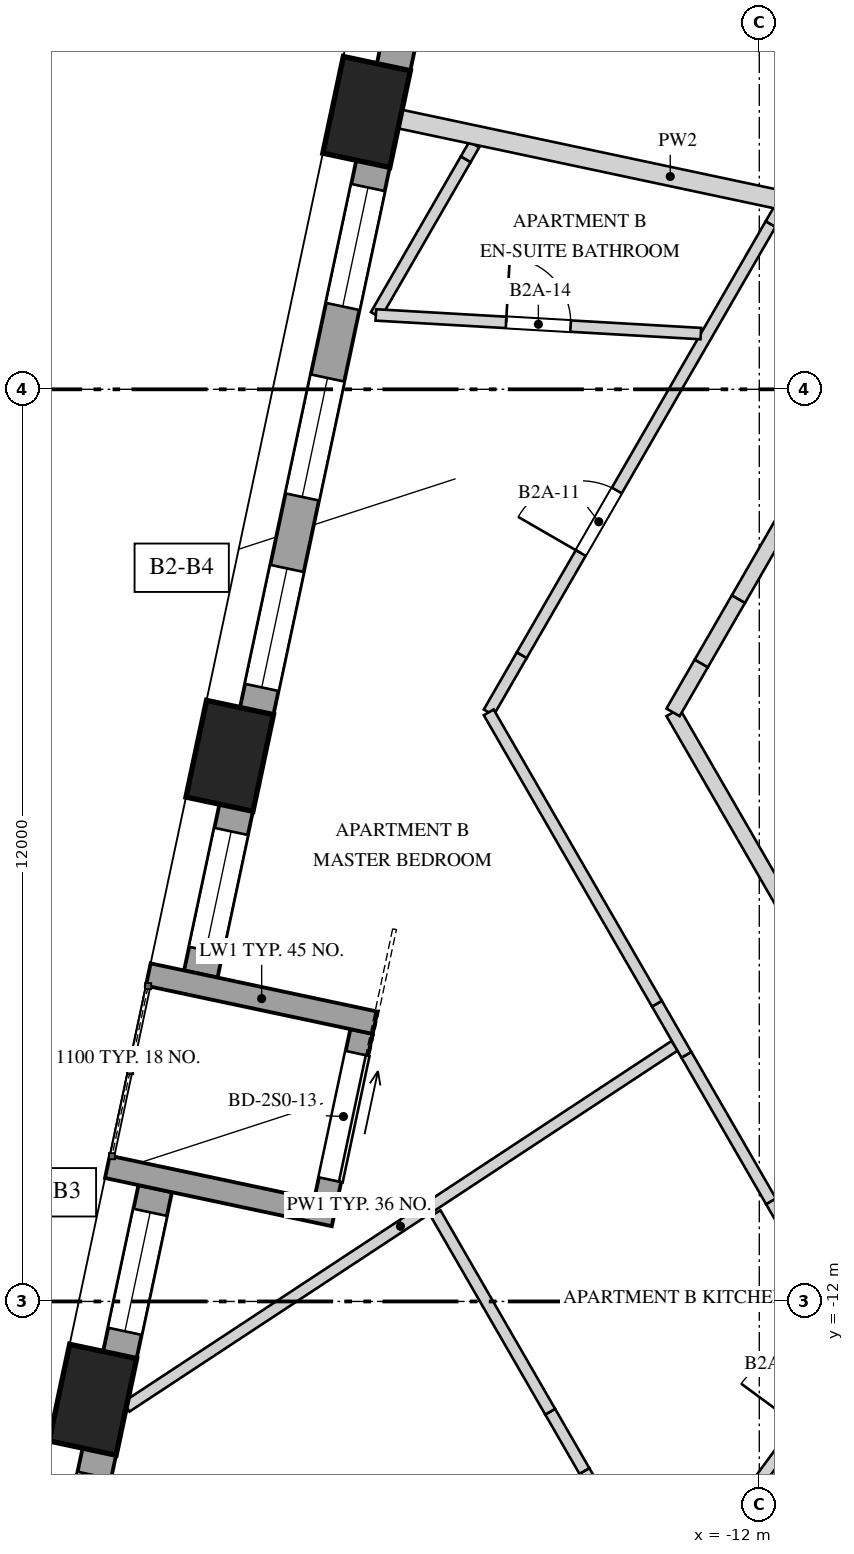
"""IFC4 building model, lengths in metres.
Left out: names, types, materials, properties, quantities, classifications, styles, units other than length and angle.
Written with IfcOpenShell. Run it as: python <this file> out.ifc"""

import sys

from ifc_helpers import new_model, si_unit, direction, frame, frame_2d, origin, origin_2d, place, context, subcontext, project, spatial, rectangle, extrude, element, fill, save


model = new_model("IFC4")
c1 = context("Model", 3, precision=1e-05, world=origin(), true_north=direction((0.0, 1.0)))
c2 = subcontext(c1, "Body", "Model", "MODEL_VIEW")
j1 = project(units=[si_unit("LENGTHUNIT", "METRE"), si_unit("PLANEANGLEUNIT", "RADIAN")], contexts=[c1])
p1 = place(None, origin())
s1 = spatial("IfcSite", under=j1, at=p1, CompositionType="ELEMENT")
p2 = place(p1, origin())
s2 = spatial("IfcBuilding", under=s1, at=p2, CompositionType="ELEMENT")
p3 = place(p2, frame((0.0, 0.0, 88.4)))
s3 = spatial("IfcBuildingStorey", under=s2, at=p3, CompositionType="ELEMENT", Elevation=88.4)
for number, where, z_axis, x_axis in (
    (1, (-17.167, 3.649, -0.35), (0.0, 0.0, 1.0), (-0.208, -0.978, 0.0)),
    (2, (-18.967, -4.822, -0.35), (0.0, 0.0, 1.0), (-0.208, -0.978, 0.0)),
    (3, (-20.768, -13.293, -0.35), (0.0, 0.0, 1.0), (-0.208, -0.978, 0.0)),
):
    element("IfcColumn", number, at=place(p3, frame(where, z_axis=z_axis, x_axis=x_axis)), inside=s3, PredefinedType="COLUMN", context=c2, shape_type="SweptSolid", body=[
        extrude(rectangle(XDim=1.3, YDim=0.9, at=origin_2d()), origin(), (0.0, 0.0, 1.0), 4.35),
    ])
p4 = place(p3, frame((-16.346, 6.426, 0.0), z_axis=(0.0, 0.0, 1.0), x_axis=(-0.207918801611, -0.978146089261, 0.0)))
e4 = element("IfcWall", 4, at=p4, inside=s3, PredefinedType="SOLIDWALL", context=c2, shape_type="SweptSolid", body=[
    extrude(rectangle(XDim=2.237, YDim=0.45, at=frame_2d((1.118, 0.0))), origin(), (0.0, 0.0, 1.0), 3.3),
])
p5 = place(p4, frame((0.318, 0.0, 0.7)))
e5 = element("IfcOpeningElement", 5, at=p5, cuts=e4, PredefinedType="OPENING", context=c2, shape_type="SweptSolid", body=[
    extrude(rectangle(XDim=1.6, YDim=2.3, at=frame_2d((0.8, 1.15))), frame((0.0, 0.235, 0.0), z_axis=(0.0, -1.0, 0.0), x_axis=(1.0, 0.0, 0.0)), (0.0, 0.0, 1.0), 0.47),
])
p6 = place(p3, frame((-17.082, 2.966, 0.0), z_axis=(0.0, 0.0, 1.0), x_axis=(-0.207909137741, -0.978148143403, 0.0)))
e6 = element("IfcWall", 6, at=p6, inside=s3, PredefinedType="SOLIDWALL", context=c2, shape_type="SweptSolid", body=[
    extrude(rectangle(XDim=7.36, YDim=0.45, at=frame_2d((3.68, 0.0))), origin(), (0.0, 0.0, 1.0), 3.3),
])
p7 = place(p6, frame((0.318, 0.0, 0.7)))
e7 = element("IfcOpeningElement", 7, at=p7, cuts=e6, PredefinedType="OPENING", context=c2, shape_type="SweptSolid", body=[
    extrude(rectangle(XDim=1.6, YDim=2.3, at=frame_2d((0.8, 1.15))), frame((0.0, 0.235, 0.0), z_axis=(0.0, -1.0, 0.0), x_axis=(1.0, 0.0, 0.0)), (0.0, 0.0, 1.0), 0.47),
])
p8 = place(p6, frame((2.88, 0.0, 0.7)))
e8 = element("IfcOpeningElement", 8, at=p8, cuts=e6, PredefinedType="OPENING", context=c2, shape_type="SweptSolid", body=[
    extrude(rectangle(XDim=1.6, YDim=2.3, at=frame_2d((0.8, 1.15))), frame((0.0, 0.235, 0.0), z_axis=(0.0, -1.0, 0.0), x_axis=(1.0, 0.0, 0.0)), (0.0, 0.0, 1.0), 0.47),
])
p9 = place(p6, frame((5.442, 0.0, 0.7)))
e9 = element("IfcOpeningElement", 9, at=p9, cuts=e6, PredefinedType="OPENING", context=c2, shape_type="SweptSolid", body=[
    extrude(rectangle(XDim=1.6, YDim=2.3, at=frame_2d((0.8, 1.15))), frame((0.0, 0.235, 0.0), z_axis=(0.0, -1.0, 0.0), x_axis=(1.0, 0.0, 0.0)), (0.0, 0.0, 1.0), 0.47),
])
p10 = place(p3, frame((-18.882, -5.505, 0.0), z_axis=(0.0, 0.0, 1.0), x_axis=(-0.207918801611, -0.978146089261, 0.0)))
e10 = element("IfcWall", 10, at=p10, inside=s3, PredefinedType="SOLIDWALL", context=c2, shape_type="SweptSolid", body=[
    extrude(rectangle(XDim=2.237, YDim=0.45, at=frame_2d((1.118, 0.0))), origin(), (0.0, 0.0, 1.0), 3.3),
])
p11 = place(p10, frame((0.318, 0.0, 0.7)))
e11 = element("IfcOpeningElement", 11, at=p11, cuts=e10, PredefinedType="OPENING", context=c2, shape_type="SweptSolid", body=[
    extrude(rectangle(XDim=1.6, YDim=2.3, at=frame_2d((0.8, 1.15))), frame((0.0, 0.235, 0.0), z_axis=(0.0, -1.0, 0.0), x_axis=(1.0, 0.0, 0.0)), (0.0, 0.0, 1.0), 0.47),
])
p12 = place(p3, frame((-19.947, -10.516, 0.0), z_axis=(0.0, 0.0, 1.0), x_axis=(-0.207941001029, -0.978141370197, 0.0)))
e12 = element("IfcWall", 12, at=p12, inside=s3, PredefinedType="SOLIDWALL", context=c2, shape_type="SweptSolid", body=[
    extrude(rectangle(XDim=2.237, YDim=0.45, at=frame_2d((1.118, 0.0))), origin(), (0.0, 0.0, 1.0), 3.3),
])
p13 = place(p12, frame((0.318, 0.0, 0.7)))
e13 = element("IfcOpeningElement", 13, at=p13, cuts=e12, PredefinedType="OPENING", context=c2, shape_type="SweptSolid", body=[
    extrude(rectangle(XDim=1.6, YDim=2.3, at=frame_2d((0.8, 1.15))), frame((0.0, 0.235, 0.0), z_axis=(0.0, -1.0, 0.0), x_axis=(1.0, 0.0, 0.0)), (0.0, 0.0, 1.0), 0.47),
])
p14 = place(p3, frame((-20.683, -13.976, 0.0), z_axis=(0.0, 0.0, 1.0), x_axis=(-0.207941001029, -0.978141370197, 0.0)))
e14 = element("IfcWall", 14, at=p14, inside=s3, PredefinedType="SOLIDWALL", context=c2, shape_type="SweptSolid", body=[
    extrude(rectangle(XDim=2.237, YDim=0.45, at=frame_2d((1.118, 0.0))), origin(), (0.0, 0.0, 1.0), 3.3),
])
p15 = place(p14, frame((0.318, 0.0, 0.7)))
e15 = element("IfcOpeningElement", 15, at=p15, cuts=e14, PredefinedType="OPENING", context=c2, shape_type="SweptSolid", body=[
    extrude(rectangle(XDim=1.6, YDim=2.3, at=frame_2d((0.8, 1.15))), frame((0.0, 0.235, 0.0), z_axis=(0.0, -1.0, 0.0), x_axis=(1.0, 0.0, 0.0)), (0.0, 0.0, 1.0), 0.47),
])
p16 = place(p3, frame((-17.233, -8.449, 0.0), z_axis=(0.0, 0.0, 1.0), x_axis=(-0.207866417042, -0.978157222877, 0.0)))
e16 = element("IfcWall", 16, at=p16, inside=s3, PredefinedType="SOLIDWALL", context=c2, shape_type="SweptSolid", body=[
    extrude(rectangle(XDim=2.287, YDim=0.3, at=frame_2d((1.144, 0.0))), origin(), (0.0, 0.0, 1.0), 3.3),
])
p17 = place(p16, frame((0.293, 0.0, 0.0)))
e17 = element("IfcOpeningElement", 17, at=p17, cuts=e16, PredefinedType="OPENING", context=c2, shape_type="SweptSolid", body=[
    extrude(rectangle(XDim=1.7, YDim=2.4, at=frame_2d((0.85, 1.2))), frame((0.0, 0.16, 0.0), z_axis=(0.0, -1.0, 0.0), x_axis=(1.0, 0.0, 0.0)), (0.0, 0.0, 1.0), 0.32),
])
for number, where, z_axis, x_axis in (
    (18, (-20.039, -7.699, 0.0), (0.0, 0.0, 1.0), (0.978, -0.208, 0.0)),
    (19, (-20.576, -10.229, 0.0), (0.0, 0.0, 1.0), (0.978, -0.208, 0.0)),
):
    element("IfcWall", number, at=place(p3, frame(where, z_axis=z_axis, x_axis=x_axis)), inside=s3, PredefinedType="SOLIDWALL", context=c2, shape_type="SweptSolid", body=[
        extrude(rectangle(XDim=3.05, YDim=0.3, at=frame_2d((1.525, 0.0))), origin(), (0.0, 0.0, 1.0), 3.3),
    ])
p18 = place(p3, frame((-20.327, -13.387, 0.0), z_axis=(0.0, 0.0, 1.0), x_axis=(0.835168014777, 0.549994897334, 0.0)))
e20 = element("IfcWall", 20, at=p18, inside=s3, PredefinedType="PARTITIONING", context=c2, shape_type="SweptSolid", body=[
    extrude(rectangle(XDim=8.637, YDim=0.15, at=frame_2d((4.319, 0.0))), origin(), (0.0, 0.0, 1.0), 2.75),
])
p19 = place(p3, frame((-17.044, 0.979, 0.0), z_axis=(0.0, 0.0, 1.0), x_axis=(0.499969694265, 0.866042900102, 0.0)))
e21 = element("IfcWall", 21, at=p19, inside=s3, PredefinedType="PARTITIONING", context=c2, shape_type="SweptSolid", body=[
    extrude(rectangle(XDim=2.365, YDim=0.15, at=frame_2d((1.183, 0.0))), origin(), (0.0, 0.0, 1.0), 3.65),
])
p20 = place(p3, frame((-15.862, 3.027, 0.0), z_axis=(0.0, 0.0, 1.0), x_axis=(0.500605348058, 0.865675623716, 0.0)))
e22 = element("IfcWall", 22, at=p20, inside=s3, PredefinedType="PARTITIONING", context=c2, shape_type="SweptSolid", body=[
    extrude(rectangle(XDim=0.223, YDim=0.15, at=frame_2d((0.112, 0.0))), origin(), (0.0, 0.0, 1.0), 2.95),
])
p21 = place(p3, frame((-15.56, -4.25, 0.0), z_axis=(0.0, 0.0, 1.0), x_axis=(0.499884524299, 0.866092063448, 0.0)))
e23 = element("IfcWall", 23, at=p21, inside=s3, PredefinedType="PARTITIONING", context=c2, shape_type="SweptSolid", body=[
    extrude(rectangle(XDim=0.869, YDim=0.15, at=frame_2d((0.435, 0.0))), origin(), (0.0, 0.0, 1.0), 2.95),
])
p22 = place(p3, frame((-15.125, -3.497, 0.0), z_axis=(0.0, 0.0, 1.0), x_axis=(0.500008610982, 0.866020432175, 0.0)))
e24 = element("IfcWall", 24, at=p22, inside=s3, PredefinedType="PARTITIONING", context=c2, shape_type="SweptSolid", body=[
    extrude(rectangle(XDim=6.548, YDim=0.15, at=frame_2d((3.274, 0.0))), origin(), (0.0, 0.0, 1.0), 3.65),
])
p23 = place(p22, frame((1.551, 0.0, 0.0)))
e25 = element("IfcOpeningElement", 25, at=p23, cuts=e24, PredefinedType="OPENING", context=c2, shape_type="SweptSolid", body=[
    extrude(rectangle(XDim=0.95, YDim=2.4, at=frame_2d((0.475, 1.2))), frame((0.0, 0.085, 0.0), z_axis=(0.0, -1.0, 0.0), x_axis=(1.0, 0.0, 0.0)), (0.0, 0.0, 1.0), 0.17),
])
p24 = place(p3, frame((-11.851, 2.174, 0.0), z_axis=(0.0, 0.0, 1.0), x_axis=(0.500059846627, 0.865990848561, 0.0)))
e26 = element("IfcWall", 26, at=p24, inside=s3, PredefinedType="PARTITIONING", context=c2, shape_type="SweptSolid", body=[
    extrude(rectangle(XDim=0.71, YDim=0.15, at=frame_2d((0.355, 0.0))), origin(), (0.0, 0.0, 1.0), 2.95),
])
p25 = place(p3, frame((-13.712, -15.25, 0.0), z_axis=(0.0, 0.0, 1.0), x_axis=(-0.499907924584, 0.866078557025, 0.0)))
e27 = element("IfcWall", 27, at=p25, inside=s3, PredefinedType="PARTITIONING", context=c2, shape_type="SweptSolid", body=[
    extrude(rectangle(XDim=1.177, YDim=0.15, at=frame_2d((0.589, 0.0))), origin(), (0.0, 0.0, 1.0), 3.65),
])
p26 = place(p3, frame((-14.301, -14.23, 0.0), z_axis=(0.0, 0.0, 1.0), x_axis=(-0.499988457423, 0.866032067792, 0.0)))
e28 = element("IfcWall", 28, at=p26, inside=s3, PredefinedType="PARTITIONING", context=c2, shape_type="SweptSolid", body=[
    extrude(rectangle(XDim=0.9, YDim=0.15, at=frame_2d((0.45, 0.0))), origin(), (0.0, 0.0, 1.0), 2.55),
])
p27 = place(p3, frame((-14.751, -13.45, 0.0), z_axis=(0.0, 0.0, 1.0), x_axis=(-0.499979445284, 0.86603727073, 0.0)))
e29 = element("IfcWall", 29, at=p27, inside=s3, PredefinedType="PARTITIONING", context=c2, shape_type="SweptSolid", body=[
    extrude(rectangle(XDim=3.015, YDim=0.15, at=frame_2d((1.508, 0.0))), origin(), (0.0, 0.0, 1.0), 3.65),
])
p28 = place(p3, frame((-17.044, 0.979, 0.0), z_axis=(0.0, 0.0, 1.0), x_axis=(0.998356921025, -0.057301468054, 0.0)))
e30 = element("IfcWall", 30, at=p28, inside=s3, PredefinedType="PARTITIONING", context=c2, shape_type="SweptSolid", body=[
    extrude(rectangle(XDim=4.282, YDim=0.15, at=frame_2d((2.141, 0.0))), origin(), (0.0, 0.0, 1.0), 3.65),
])
p29 = place(p28, frame((1.716, 0.0, 0.0)))
e31 = element("IfcOpeningElement", 31, at=p29, cuts=e30, PredefinedType="OPENING", context=c2, shape_type="SweptSolid", body=[
    extrude(rectangle(XDim=0.85, YDim=2.4, at=frame_2d((0.425, 1.2))), frame((0.0, 0.085, 0.0), z_axis=(0.0, -1.0, 0.0), x_axis=(1.0, 0.0, 0.0)), (0.0, 0.0, 1.0), 0.17),
])
p30 = place(p3, frame((-12.599, -15.175, 0.0), z_axis=(0.0, 0.0, 1.0), x_axis=(0.592829004129, 0.805328362758, 0.0)))
e32 = element("IfcWall", 32, at=p30, inside=s3, PredefinedType="PARTITIONING", context=c2, shape_type="SweptSolid", body=[
    extrude(rectangle(XDim=4.75, YDim=0.15, at=frame_2d((2.375, 0.0))), origin(), (0.0, 0.0, 1.0), 3.65),
])
p31 = place(p30, frame((1.9, 0.0, 0.0)))
e33 = element("IfcOpeningElement", 33, at=p31, cuts=e32, PredefinedType="OPENING", context=c2, shape_type="SweptSolid", body=[
    extrude(rectangle(XDim=0.95, YDim=2.4, at=frame_2d((0.475, 1.2))), frame((0.0, 0.085, 0.0), z_axis=(0.0, -1.0, 0.0), x_axis=(1.0, 0.0, 0.0)), (0.0, 0.0, 1.0), 0.17),
])
p32 = place(p3, frame((-11.46, -11.35, 0.0), z_axis=(0.0, 0.0, 1.0), x_axis=(-0.49974986996, 0.866169768276, 0.0)))
e34 = element("IfcWall", 34, at=p32, inside=s3, PredefinedType="PARTITIONING", context=c2, shape_type="SweptSolid", body=[
    extrude(rectangle(XDim=0.771, YDim=0.15, at=frame_2d((0.385, 0.0))), origin(), (0.0, 0.0, 1.0), 2.55),
])
p33 = place(p3, frame((-11.846, -10.682, 0.0), z_axis=(0.0, 0.0, 1.0), x_axis=(-0.500067425712, 0.865986472032, 0.0)))
e35 = element("IfcWall", 35, at=p33, inside=s3, PredefinedType="PARTITIONING", context=c2, shape_type="SweptSolid", body=[
    extrude(rectangle(XDim=2.226, YDim=0.15, at=frame_2d((1.113, 0.0))), origin(), (0.0, 0.0, 1.0), 3.65),
])
p34 = place(p3, frame((-12.959, -8.755, 0.0), z_axis=(0.0, 0.0, 1.0), x_axis=(-0.500031167255, 0.866007408613, 0.0)))
e36 = element("IfcWall", 36, at=p34, inside=s3, PredefinedType="PARTITIONING", context=c2, shape_type="SweptSolid", body=[
    extrude(rectangle(XDim=0.776, YDim=0.15, at=frame_2d((0.388, 0.0))), origin(), (0.0, 0.0, 1.0), 2.75),
])
p35 = place(p3, frame((-13.347, -8.083, 0.0), z_axis=(0.0, 0.0, 1.0), x_axis=(-0.499983483481, 0.866034939391, 0.0)))
e37 = element("IfcWall", 37, at=p35, inside=s3, PredefinedType="PARTITIONING", context=c2, shape_type="SweptSolid", body=[
    extrude(rectangle(XDim=4.426, YDim=0.15, at=frame_2d((2.213, 0.0))), origin(), (0.0, 0.0, 1.0), 3.65),
])
p36 = place(p3, frame((-9.616, 2.044, 0.0), z_axis=(0.0, 0.0, 1.0), x_axis=(-0.978148093834, 0.207909370951, 0.0)))
e38 = element("IfcWall", 38, at=p36, inside=s3, PredefinedType="SOLIDWALL", context=c2, shape_type="SweptSolid", body=[
    extrude(rectangle(XDim=7.269, YDim=0.25, at=frame_2d((3.634, 0.0))), origin(), (0.0, 0.0, 1.0), 2.95),
])
p37 = place(p3, frame((-11.582, -6.939, 0.0), z_axis=(0.0, 0.0, 1.0), x_axis=(-0.500037831766, 0.866003560503, 0.0)))
e39 = element("IfcWall", 39, at=p37, inside=s3, PredefinedType="SOLIDWALL", context=c2, shape_type="SweptSolid", body=[
    extrude(rectangle(XDim=3.105, YDim=0.2, at=frame_2d((1.552, 0.0))), origin(), (0.0, 0.0, 1.0), 3.65),
])
p38 = place(p3, frame((-13.135, -4.25, 0.0), z_axis=(0.0, 0.0, 1.0), x_axis=(0.499987686533, 0.866032512851, 0.0)))
e40 = element("IfcWall", 40, at=p38, inside=s3, PredefinedType="SOLIDWALL", context=c2, shape_type="SweptSolid", body=[
    extrude(rectangle(XDim=0.744, YDim=0.2, at=frame_2d((0.372, 0.0))), origin(), (0.0, 0.0, 1.0), 3.65),
])
p39 = place(p3, frame((-12.763, -3.606, 0.0), z_axis=(0.0, 0.0, 1.0), x_axis=(0.500061185694, 0.865990075325, 0.0)))
e41 = element("IfcWall", 41, at=p39, inside=s3, PredefinedType="SOLIDWALL", context=c2, shape_type="SweptSolid", body=[
    extrude(rectangle(XDim=0.978, YDim=0.2, at=frame_2d((0.489, 0.0))), origin(), (0.0, 0.0, 1.0), 2.95),
])
p40 = place(p3, frame((-12.274, -2.76, 0.0), z_axis=(0.0, 0.0, 1.0), x_axis=(0.500001317485, 0.866024643133, 0.0)))
e42 = element("IfcWall", 42, at=p40, inside=s3, PredefinedType="SOLIDWALL", context=c2, shape_type="SweptSolid", body=[
    extrude(rectangle(XDim=5.153, YDim=0.2, at=frame_2d((2.577, 0.0))), origin(), (0.0, 0.0, 1.0), 3.65),
])
p41 = place(p7, origin())
e43 = element("IfcWindow", 43, at=p41, inside=s3, PartitioningType="SINGLE_PANEL", PredefinedType="WINDOW", context=c2, shape_type="SweptSolid", body=[
    extrude(rectangle(XDim=1.6, YDim=2.3, at=frame_2d((0.8, 1.15))), frame((0.0, 0.03, 0.0), z_axis=(0.0, -1.0, 0.0), x_axis=(1.0, 0.0, 0.0)), (0.0, 0.0, 1.0), 0.06),
])
fill(e7, e43)
p42 = place(p8, origin())
e44 = element("IfcWindow", 44, at=p42, inside=s3, PartitioningType="SINGLE_PANEL", PredefinedType="WINDOW", context=c2, shape_type="SweptSolid", body=[
    extrude(rectangle(XDim=1.6, YDim=2.3, at=frame_2d((0.8, 1.15))), frame((0.0, 0.03, 0.0), z_axis=(0.0, -1.0, 0.0), x_axis=(1.0, 0.0, 0.0)), (0.0, 0.0, 1.0), 0.06),
])
fill(e8, e44)
p43 = place(p9, origin())
e45 = element("IfcWindow", 45, at=p43, inside=s3, PartitioningType="SINGLE_PANEL", PredefinedType="WINDOW", context=c2, shape_type="SweptSolid", body=[
    extrude(rectangle(XDim=1.6, YDim=2.3, at=frame_2d((0.8, 1.15))), frame((0.0, 0.03, 0.0), z_axis=(0.0, -1.0, 0.0), x_axis=(1.0, 0.0, 0.0)), (0.0, 0.0, 1.0), 0.06),
])
fill(e9, e45)
p44 = place(p11, origin())
e46 = element("IfcWindow", 46, at=p44, inside=s3, PartitioningType="SINGLE_PANEL", PredefinedType="WINDOW", context=c2, shape_type="SweptSolid", body=[
    extrude(rectangle(XDim=1.6, YDim=2.3, at=frame_2d((0.8, 1.15))), frame((0.0, 0.03, 0.0), z_axis=(0.0, -1.0, 0.0), x_axis=(1.0, 0.0, 0.0)), (0.0, 0.0, 1.0), 0.06),
])
fill(e11, e46)
p45 = place(p13, origin())
e47 = element("IfcWindow", 47, at=p45, inside=s3, PartitioningType="SINGLE_PANEL", PredefinedType="WINDOW", context=c2, shape_type="SweptSolid", body=[
    extrude(rectangle(XDim=1.6, YDim=2.3, at=frame_2d((0.8, 1.15))), frame((0.0, 0.03, 0.0), z_axis=(0.0, -1.0, 0.0), x_axis=(1.0, 0.0, 0.0)), (0.0, 0.0, 1.0), 0.06),
])
fill(e13, e47)
p46 = place(p15, origin())
e48 = element("IfcWindow", 48, at=p46, inside=s3, PartitioningType="SINGLE_PANEL", PredefinedType="WINDOW", context=c2, shape_type="SweptSolid", body=[
    extrude(rectangle(XDim=1.6, YDim=2.3, at=frame_2d((0.8, 1.15))), frame((0.0, 0.03, 0.0), z_axis=(0.0, -1.0, 0.0), x_axis=(1.0, 0.0, 0.0)), (0.0, 0.0, 1.0), 0.06),
])
fill(e15, e48)
p47 = place(p17, origin())
e49 = element("IfcDoor", 49, at=p47, inside=s3, OperationType="SLIDING_TO_LEFT", PredefinedType="DOOR", context=c2, shape_type="SweptSolid", body=[
    extrude(rectangle(XDim=1.7, YDim=2.4, at=frame_2d((0.85, 1.2))), frame((0.0, 0.025, 0.0), z_axis=(0.0, -1.0, 0.0), x_axis=(1.0, 0.0, 0.0)), (0.0, 0.0, 1.0), 0.05),
])
fill(e17, e49)
p48 = place(p23, origin())
e50 = element("IfcDoor", 50, at=p48, inside=s3, OperationType="SINGLE_SWING_LEFT", PredefinedType="DOOR", context=c2, shape_type="SweptSolid", body=[
    extrude(rectangle(XDim=0.95, YDim=2.4, at=frame_2d((0.475, 1.2))), frame((0.0, 0.025, 0.0), z_axis=(0.0, -1.0, 0.0), x_axis=(1.0, 0.0, 0.0)), (0.0, 0.0, 1.0), 0.05),
])
fill(e25, e50)
p49 = place(p29, origin())
e51 = element("IfcDoor", 51, at=p49, inside=s3, OperationType="SINGLE_SWING_RIGHT", PredefinedType="DOOR", context=c2, shape_type="SweptSolid", body=[
    extrude(rectangle(XDim=0.85, YDim=2.4, at=frame_2d((0.425, 1.2))), frame((0.0, 0.025, 0.0), z_axis=(0.0, -1.0, 0.0), x_axis=(1.0, 0.0, 0.0)), (0.0, 0.0, 1.0), 0.05),
])
fill(e31, e51)
save(model, sys.argv[1])
